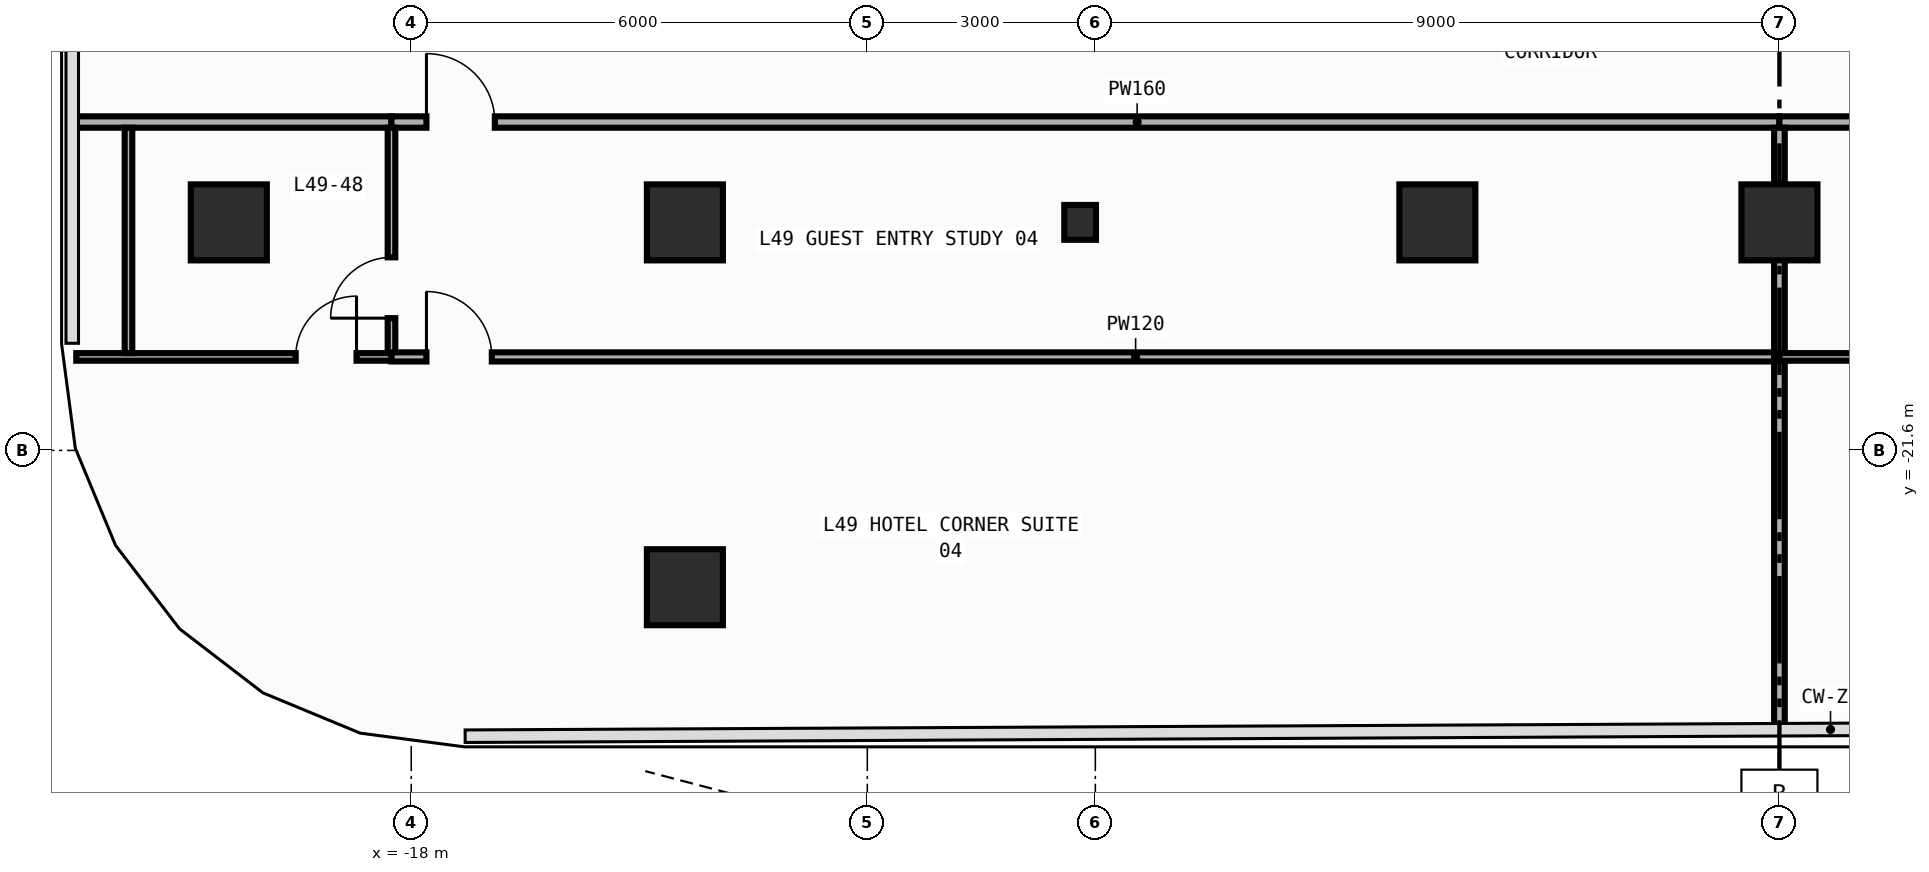
"""IFC4 building model, lengths in metres.
Left out: names, types, materials, properties, quantities, classifications, styles, units other than length and angle.
Written with IfcOpenShell. Run it as: python <this file> out.ifc"""

import sys

from ifc_helpers import new_model, si_unit, direction, frame, frame_2d, origin, origin_2d, place, context, subcontext, project, spatial, rectangle, i_section, extrude, element, fill, save


model = new_model("IFC4")
c1 = context("Model", 3, precision=1e-05, world=origin(), true_north=direction((0.0, 1.0)))
c2 = subcontext(c1, "Body", "Model", "MODEL_VIEW")
j1 = project(units=[si_unit("LENGTHUNIT", "METRE"), si_unit("PLANEANGLEUNIT", "RADIAN")], contexts=[c1])
p1 = place(None, origin())
s1 = spatial("IfcSite", under=j1, at=p1, CompositionType="ELEMENT")
p2 = place(p1, origin())
s2 = spatial("IfcBuilding", under=s1, at=p2, CompositionType="ELEMENT")
p3 = place(p2, frame((0.0, 0.0, 210.6)))
s3 = spatial("IfcBuildingStorey", under=s2, at=p3, CompositionType="ELEMENT", Elevation=210.6)
p4 = place(p3, frame((-9.2, -18.6, 0.0), z_axis=(0.0, 0.0, 1.0), x_axis=(1.0, 0.0, 0.0)))
e1 = element("IfcColumn", 1, at=p4, inside=s3, PredefinedType="COLUMN", context=c2, shape_type="SweptSolid", body=[
    extrude(i_section(OverallWidth=0.417, OverallDepth=0.458, WebThickness=0.03, FlangeThickness=0.05, FilletRadius=0.022, at=origin_2d()), origin(), (0.0, 0.0, 1.0), 3.8),
])
for number, where, z_axis, x_axis in (
    (2, (-20.4, -18.6, 0.0), (0.0, 0.0, 1.0), (1.0, 0.0, 0.0)),
    (3, (-14.4, -18.6, 0.0), (0.0, 0.0, 1.0), (1.0, 0.0, 0.0)),
    (4, (-4.5, -18.6, 0.0), (0.0, 0.0, 1.0), (1.0, 0.0, 0.0)),
    (5, (0.0, -18.6, 0.0), (0.0, 0.0, 1.0), (1.0, 0.0, 0.0)),
    (6, (-14.4, -23.4, 0.0), (0.0, 0.0, 1.0), (1.0, 0.0, 0.0)),
):
    element("IfcColumn", number, at=place(p3, frame(where, z_axis=z_axis, x_axis=x_axis)), inside=s3, PredefinedType="COLUMN", context=c2, shape_type="SweptSolid", body=[
        extrude(rectangle(XDim=1.0, YDim=1.0, at=origin_2d()), origin(), (0.0, 0.0, 1.0), 3.8),
    ])
p5 = place(p3, frame((-22.455, -17.28, 0.0), z_axis=(0.0, 0.0, 1.0), x_axis=(1.0, 0.0, 0.0)))
e7 = element("IfcWall", 7, at=p5, inside=s3, PredefinedType="PARTITIONING", context=c2, shape_type="SweptSolid", body=[
    extrude(rectangle(XDim=4.195, YDim=0.15, at=frame_2d((2.098, 0.0))), origin(), (0.0, 0.0, 1.0), 3.45),
])
p6 = place(p3, frame((-18.26, -17.28, 0.0), z_axis=(0.0, 0.0, 1.0), x_axis=(1.0, 0.0, 0.0)))
e8 = element("IfcWall", 8, at=p6, inside=s3, PredefinedType="PARTITIONING", context=c2, shape_type="SweptSolid", body=[
    extrude(rectangle(XDim=18.26, YDim=0.15, at=frame_2d((9.13, 0.0))), origin(), (0.0, 0.0, 1.0), 3.45),
])
p7 = place(p6, frame((0.46, 0.0, 0.0)))
e9 = element("IfcOpeningElement", 9, at=p7, cuts=e8, PredefinedType="OPENING", context=c2, shape_type="SweptSolid", body=[
    extrude(rectangle(XDim=0.9, YDim=2.15, at=frame_2d((0.45, 1.075))), frame((0.0, 0.085, 0.0), z_axis=(0.0, -1.0, 0.0), x_axis=(1.0, 0.0, 0.0)), (0.0, 0.0, 1.0), 0.17),
])
p8 = place(p3, frame((0.0, -17.28, 0.0), z_axis=(0.0, 0.0, 1.0), x_axis=(1.0, 0.0, 0.0)))
e10 = element("IfcWall", 10, at=p8, inside=s3, PredefinedType="PARTITIONING", context=c2, shape_type="SweptSolid", body=[
    extrude(rectangle(XDim=3.54, YDim=0.15, at=frame_2d((1.77, 0.0))), origin(), (0.0, 0.0, 1.0), 3.45),
])
p9 = place(p3, frame((-18.26, -20.32, 0.0), z_axis=(0.0, 0.0, 1.0), x_axis=(0.0, 1.0, 0.0)))
e11 = element("IfcWall", 11, at=p9, inside=s3, PredefinedType="PARTITIONING", context=c2, shape_type="SweptSolid", body=[
    extrude(rectangle(XDim=2.965, YDim=0.1, at=frame_2d((1.482, 0.0))), origin(), (0.0, 0.0, 1.0), 3.45),
])
p10 = place(p9, frame((0.46, 0.0, 0.0)))
e12 = element("IfcOpeningElement", 12, at=p10, cuts=e11, PredefinedType="OPENING", context=c2, shape_type="SweptSolid", body=[
    extrude(rectangle(XDim=0.8, YDim=2.1, at=frame_2d((0.4, 1.05))), frame((0.0, 0.06, 0.0), z_axis=(0.0, -1.0, 0.0), x_axis=(1.0, 0.0, 0.0)), (0.0, 0.0, 1.0), 0.12),
])
p11 = place(p3, frame((-22.407, -20.37, 0.0), z_axis=(0.0, 0.0, 1.0), x_axis=(1.0, 0.0, 0.0)))
e13 = element("IfcWall", 13, at=p11, inside=s3, PredefinedType="PARTITIONING", context=c2, shape_type="SweptSolid", body=[
    extrude(rectangle(XDim=4.147, YDim=0.1, at=frame_2d((2.073, 0.0))), origin(), (0.0, 0.0, 1.0), 3.45),
])
p12 = place(p11, frame((2.887, 0.0, 0.0)))
e14 = element("IfcOpeningElement", 14, at=p12, cuts=e13, PredefinedType="OPENING", context=c2, shape_type="SweptSolid", body=[
    extrude(rectangle(XDim=0.8, YDim=2.1, at=frame_2d((0.4, 1.05))), frame((0.0, 0.06, 0.0), z_axis=(0.0, -1.0, 0.0), x_axis=(1.0, 0.0, 0.0)), (0.0, 0.0, 1.0), 0.12),
])
p13 = place(p3, frame((-18.26, -20.37, 0.0), z_axis=(0.0, 0.0, 1.0), x_axis=(1.0, 0.0, 0.0)))
e15 = element("IfcWall", 15, at=p13, inside=s3, PredefinedType="PARTITIONING", context=c2, shape_type="SweptSolid", body=[
    extrude(rectangle(XDim=18.26, YDim=0.12, at=frame_2d((9.13, 0.0))), origin(), (0.0, 0.0, 1.0), 3.45),
])
p14 = place(p13, frame((0.46, 0.0, 0.0)))
e16 = element("IfcOpeningElement", 16, at=p14, cuts=e15, PredefinedType="OPENING", context=c2, shape_type="SweptSolid", body=[
    extrude(rectangle(XDim=0.86, YDim=2.15, at=frame_2d((0.43, 1.075))), frame((0.0, 0.07, 0.0), z_axis=(0.0, -1.0, 0.0), x_axis=(1.0, 0.0, 0.0)), (0.0, 0.0, 1.0), 0.14),
])
p15 = place(p3, frame((0.0, -20.37, 0.0), z_axis=(0.0, 0.0, 1.0), x_axis=(0.0, 1.0, 0.0)))
e17 = element("IfcWall", 17, at=p15, inside=s3, PredefinedType="PARTITIONING", context=c2, shape_type="SweptSolid", body=[
    extrude(rectangle(XDim=3.015, YDim=0.14, at=frame_2d((1.508, 0.0))), origin(), (0.0, 0.0, 1.0), 3.45),
])
p16 = place(p3, frame((0.0, -25.27, 0.0), z_axis=(0.0, 0.0, 1.0), x_axis=(0.0, 1.0, 0.0)))
e18 = element("IfcWall", 18, at=p16, inside=s3, PredefinedType="PARTITIONING", context=c2, shape_type="SweptSolid", body=[
    extrude(rectangle(XDim=4.9, YDim=0.14, at=frame_2d((2.45, 0.0))), origin(), (0.0, 0.0, 1.0), 3.45),
])
p17 = place(p3, frame((0.0, -20.37, 0.0), z_axis=(0.0, 0.0, 1.0), x_axis=(1.0, 0.0, 0.0)))
e19 = element("IfcWall", 19, at=p17, inside=s3, PredefinedType="PARTITIONING", context=c2, shape_type="SweptSolid", body=[
    extrude(rectangle(XDim=3.54, YDim=0.1, at=frame_2d((1.77, 0.0))), origin(), (0.0, 0.0, 1.0), 3.45),
])
p18 = place(p17, frame((1.875, 0.0, 0.0)))
e20 = element("IfcOpeningElement", 20, at=p18, cuts=e19, PredefinedType="OPENING", context=c2, shape_type="SweptSolid", body=[
    extrude(rectangle(XDim=0.8, YDim=2.1, at=frame_2d((0.4, 1.05))), frame((0.0, 0.06, 0.0), z_axis=(0.0, -1.0, 0.0), x_axis=(1.0, 0.0, 0.0)), (0.0, 0.0, 1.0), 0.12),
])
p19 = place(p3, frame((-21.72, -20.32, 0.0), z_axis=(0.0, 0.0, 1.0), x_axis=(0.0, 1.0, 0.0)))
e21 = element("IfcWall", 21, at=p19, inside=s3, PredefinedType="PARTITIONING", context=c2, shape_type="SweptSolid", body=[
    extrude(rectangle(XDim=2.965, YDim=0.1, at=frame_2d((1.482, 0.0))), origin(), (0.0, 0.0, 1.0), 3.45),
])
p20 = place(p7, origin())
e22 = element("IfcDoor", 22, at=p20, inside=s3, OperationType="SINGLE_SWING_LEFT", PredefinedType="DOOR", context=c2, shape_type="SweptSolid", body=[
    extrude(rectangle(XDim=0.9, YDim=2.15, at=frame_2d((0.45, 1.075))), frame((0.0, 0.025, 0.0), z_axis=(0.0, -1.0, 0.0), x_axis=(1.0, 0.0, 0.0)), (0.0, 0.0, 1.0), 0.05),
])
fill(e9, e22)
p21 = place(p10, origin())
e23 = element("IfcDoor", 23, at=p21, inside=s3, OperationType="SINGLE_SWING_LEFT", PredefinedType="DOOR", context=c2, shape_type="SweptSolid", body=[
    extrude(rectangle(XDim=0.8, YDim=2.1, at=frame_2d((0.4, 1.05))), frame((0.0, 0.025, 0.0), z_axis=(0.0, -1.0, 0.0), x_axis=(1.0, 0.0, 0.0)), (0.0, 0.0, 1.0), 0.05),
])
fill(e12, e23)
p22 = place(p12, origin())
e24 = element("IfcDoor", 24, at=p22, inside=s3, OperationType="SINGLE_SWING_RIGHT", PredefinedType="DOOR", context=c2, shape_type="SweptSolid", body=[
    extrude(rectangle(XDim=0.8, YDim=2.1, at=frame_2d((0.4, 1.05))), frame((0.0, 0.025, 0.0), z_axis=(0.0, -1.0, 0.0), x_axis=(1.0, 0.0, 0.0)), (0.0, 0.0, 1.0), 0.05),
])
fill(e14, e24)
p23 = place(p14, origin())
e25 = element("IfcDoor", 25, at=p23, inside=s3, OperationType="SINGLE_SWING_LEFT", PredefinedType="DOOR", context=c2, shape_type="SweptSolid", body=[
    extrude(rectangle(XDim=0.86, YDim=2.15, at=frame_2d((0.43, 1.075))), frame((0.0, 0.025, 0.0), z_axis=(0.0, -1.0, 0.0), x_axis=(1.0, 0.0, 0.0)), (0.0, 0.0, 1.0), 0.05),
])
fill(e16, e25)
save(model, sys.argv[1])
